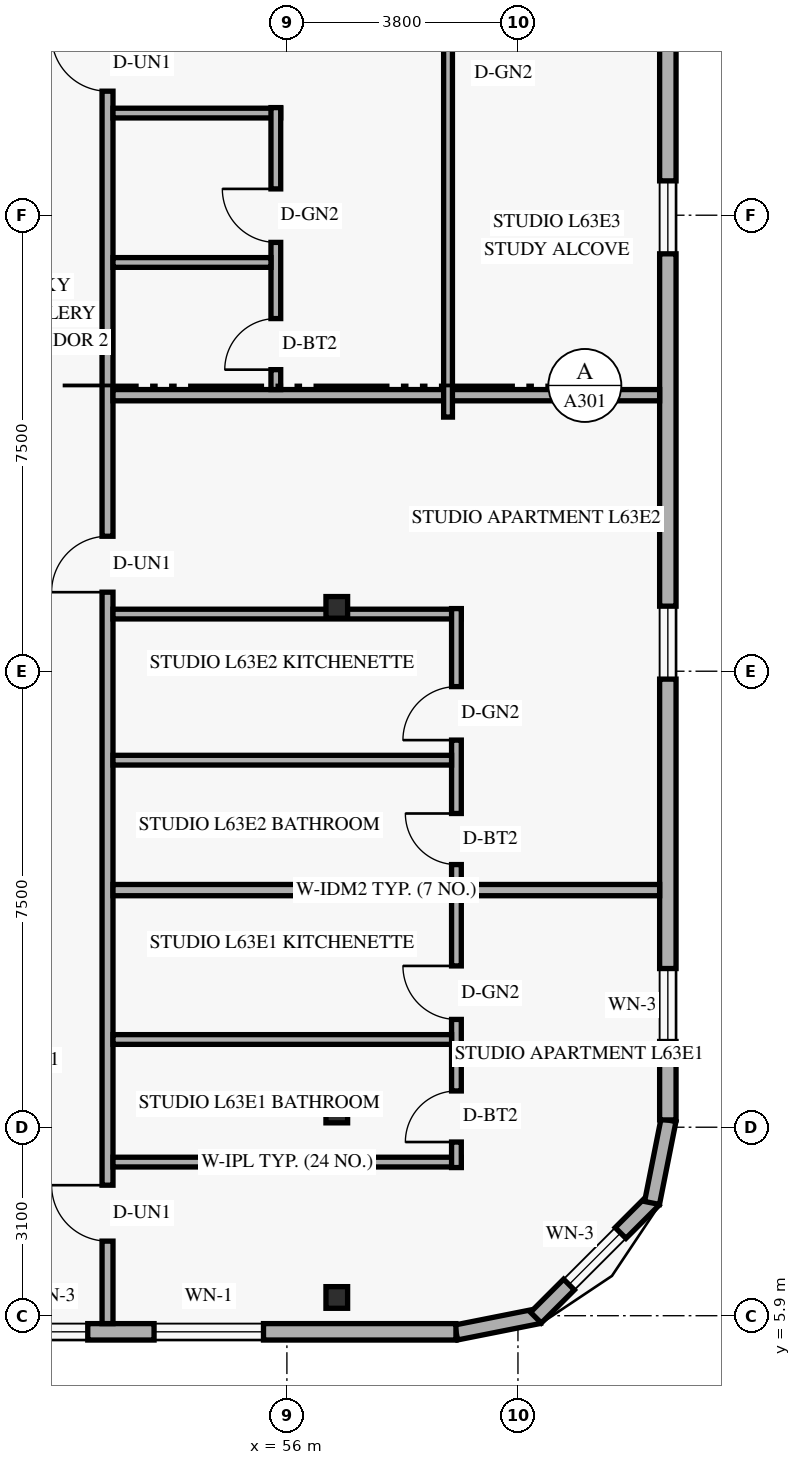
"""IFC4 building model, lengths in metres.
Left out: names, types, materials, properties, quantities, classifications, styles, units other than length and angle.
Written with IfcOpenShell. Run it as: python <this file> out.ifc"""

import sys

from ifc_helpers import new_model, si_unit, direction, frame, frame_2d, origin, origin_2d, place, context, subcontext, project, spatial, rectangle, hollow_rectangle, extrude, element, fill, save


model = new_model("IFC4")
c1 = context("Model", 3, precision=1e-05, world=origin(), true_north=direction((0.0, 1.0)))
c2 = subcontext(c1, "Body", "Model", "MODEL_VIEW")
j1 = project(units=[si_unit("LENGTHUNIT", "METRE"), si_unit("PLANEANGLEUNIT", "RADIAN")], contexts=[c1])
p1 = place(None, origin())
s1 = spatial("IfcSite", under=j1, at=p1, CompositionType="ELEMENT")
p2 = place(p1, origin())
s2 = spatial("IfcBuilding", under=s1, at=p2, CompositionType="ELEMENT")
p3 = place(p2, frame((0.0, 0.0, 242.4)))
s3 = spatial("IfcBuildingStorey", under=s2, at=p3, CompositionType="ELEMENT", Elevation=242.4)
for number, where, z_axis, x_axis in (
    (1, (56.716, 6.2, 0.0), (0.058, 0.0, 0.998), (0.0, 1.0, 0.0)),
    (2, (56.716, 9.25, 0.0), (0.058, 0.0, 0.998), (0.0, 1.0, 0.0)),
    (3, (56.716, 17.55, 0.0), (0.058, 0.0, 0.998), (0.0, 1.0, 0.0)),
):
    element("IfcColumn", number, at=place(p3, frame(where, z_axis=z_axis, x_axis=x_axis)), inside=s3, PredefinedType="COLUMN", context=c2, shape_type="SweptSolid", body=[
        extrude(hollow_rectangle(XDim=0.356, YDim=0.356, WallThickness=0.016, at=origin_2d()), origin(), (0.0, 0.0, 1.0), 3.606),
    ])
p4 = place(p3, frame((58.783, 5.624, 0.0), z_axis=(0.0, 0.0, 1.0), x_axis=(0.980809899341, 0.19496651342, 0.0)))
e4 = element("IfcWall", 4, at=p4, inside=s3, PredefinedType="SOLIDWALL", context=c2, shape_type="SweptSolid", body=[
    extrude(rectangle(XDim=1.389, YDim=0.25, at=frame_2d((0.694, 0.0))), origin(), (0.0, 0.0, 1.0), 3.36),
])
p5 = place(p3, frame((60.095, 5.868, 0.0), z_axis=(0.0, 0.0, 1.0), x_axis=(0.707106781187, 0.707106781187, 0.0)))
e5 = element("IfcWall", 5, at=p5, inside=s3, PredefinedType="SOLIDWALL", context=c2, shape_type="SweptSolid", body=[
    extrude(rectangle(XDim=2.739, YDim=0.25, at=frame_2d((1.37, 0.0))), origin(), (0.0, 0.0, 1.0), 3.36),
])
p6 = place(p5, frame((0.77, 0.0, 0.85)))
e6 = element("IfcOpeningElement", 6, at=p6, cuts=e5, PredefinedType="OPENING", context=c2, shape_type="SweptSolid", body=[
    extrude(rectangle(XDim=1.2, YDim=1.5, at=frame_2d((0.6, 0.75))), frame((0.0, 0.135, 0.0), z_axis=(0.0, -1.0, 0.0), x_axis=(1.0, 0.0, 0.0)), (0.0, 0.0, 1.0), 0.27),
])
p7 = place(p3, frame((62.005, 7.754, 0.0), z_axis=(0.0, 0.0, 1.0), x_axis=(0.195135625965, 0.9807762678, 0.0)))
e7 = element("IfcWall", 7, at=p7, inside=s3, PredefinedType="SOLIDWALL", context=c2, shape_type="SweptSolid", body=[
    extrude(rectangle(XDim=1.389, YDim=0.25, at=frame_2d((0.694, 0.0))), origin(), (0.0, 0.0, 1.0), 3.36),
])
p8 = place(p3, frame((25.82, 5.635, 0.0), z_axis=(0.0, 0.0, 1.0), x_axis=(1.0, 0.0, 0.0)))
e8 = element("IfcWall", 8, at=p8, inside=s3, PredefinedType="SOLIDWALL", context=c2, shape_type="SweptSolid", body=[
    extrude(rectangle(XDim=32.96, YDim=0.27, at=frame_2d((16.48, 0.0))), origin(), (0.0, 0.0, 1.0), 3.36),
])
p9 = place(p8, frame((3.57, 0.0, 0.85)))
e9 = element("IfcOpeningElement", 9, at=p9, cuts=e8, PredefinedType="OPENING", context=c2, shape_type="SweptSolid", body=[
    extrude(rectangle(XDim=1.8, YDim=1.6, at=frame_2d((0.9, 0.8))), frame((0.0, 0.145, 0.0), z_axis=(0.0, -1.0, 0.0), x_axis=(1.0, 0.0, 0.0)), (0.0, 0.0, 1.0), 0.29),
])
p10 = place(p8, frame((16.076, 0.0, 0.85)))
e10 = element("IfcOpeningElement", 10, at=p10, cuts=e8, PredefinedType="OPENING", context=c2, shape_type="SweptSolid", body=[
    extrude(rectangle(XDim=1.8, YDim=1.6, at=frame_2d((0.9, 0.8))), frame((0.0, 0.145, 0.0), z_axis=(0.0, -1.0, 0.0), x_axis=(1.0, 0.0, 0.0)), (0.0, 0.0, 1.0), 0.29),
])
p11 = place(p8, frame((25.705, 0.0, 0.85)))
e11 = element("IfcOpeningElement", 11, at=p11, cuts=e8, PredefinedType="OPENING", context=c2, shape_type="SweptSolid", body=[
    extrude(rectangle(XDim=1.2, YDim=1.5, at=frame_2d((0.6, 0.75))), frame((0.0, 0.145, 0.0), z_axis=(0.0, -1.0, 0.0), x_axis=(1.0, 0.0, 0.0)), (0.0, 0.0, 1.0), 0.29),
])
p12 = place(p8, frame((27.995, 0.0, 0.85)))
e12 = element("IfcOpeningElement", 12, at=p12, cuts=e8, PredefinedType="OPENING", context=c2, shape_type="SweptSolid", body=[
    extrude(rectangle(XDim=1.8, YDim=1.6, at=frame_2d((0.9, 0.8))), frame((0.0, 0.145, 0.0), z_axis=(0.0, -1.0, 0.0), x_axis=(1.0, 0.0, 0.0)), (0.0, 0.0, 1.0), 0.29),
])
p13 = place(p3, frame((62.265, 9.12, 0.0), z_axis=(0.0, 0.0, 1.0), x_axis=(0.0, 1.0, 0.0)))
e13 = element("IfcWall", 13, at=p13, inside=s3, PredefinedType="SOLIDWALL", context=c2, shape_type="SweptSolid", body=[
    extrude(rectangle(XDim=29.76, YDim=0.27, at=frame_2d((14.88, 0.0))), origin(), (0.0, 0.0, 1.0), 3.36),
])
p14 = place(p13, frame((1.29, 0.0, 0.85)))
e14 = element("IfcOpeningElement", 14, at=p14, cuts=e13, PredefinedType="OPENING", context=c2, shape_type="SweptSolid", body=[
    extrude(rectangle(XDim=1.2, YDim=1.5, at=frame_2d((0.6, 0.75))), frame((0.0, 0.145, 0.0), z_axis=(0.0, -1.0, 0.0), x_axis=(1.0, 0.0, 0.0)), (0.0, 0.0, 1.0), 0.29),
])
p15 = place(p13, frame((7.25, 0.0, 0.85)))
e15 = element("IfcOpeningElement", 15, at=p15, cuts=e13, PredefinedType="OPENING", context=c2, shape_type="SweptSolid", body=[
    extrude(rectangle(XDim=1.2, YDim=1.5, at=frame_2d((0.6, 0.75))), frame((0.0, 0.145, 0.0), z_axis=(0.0, -1.0, 0.0), x_axis=(1.0, 0.0, 0.0)), (0.0, 0.0, 1.0), 0.29),
])
p16 = place(p13, frame((14.245, 0.0, 0.85)))
e16 = element("IfcOpeningElement", 16, at=p16, cuts=e13, PredefinedType="OPENING", context=c2, shape_type="SweptSolid", body=[
    extrude(rectangle(XDim=1.2, YDim=1.5, at=frame_2d((0.6, 0.75))), frame((0.0, 0.145, 0.0), z_axis=(0.0, -1.0, 0.0), x_axis=(1.0, 0.0, 0.0)), (0.0, 0.0, 1.0), 0.29),
])
p17 = place(p13, frame((18.315, 0.0, 0.85)))
e17 = element("IfcOpeningElement", 17, at=p17, cuts=e13, PredefinedType="OPENING", context=c2, shape_type="SweptSolid", body=[
    extrude(rectangle(XDim=1.2, YDim=1.5, at=frame_2d((0.6, 0.75))), frame((0.0, 0.145, 0.0), z_axis=(0.0, -1.0, 0.0), x_axis=(1.0, 0.0, 0.0)), (0.0, 0.0, 1.0), 0.29),
])
p18 = place(p13, frame((22.975, 0.0, 0.85)))
e18 = element("IfcOpeningElement", 18, at=p18, cuts=e13, PredefinedType="OPENING", context=c2, shape_type="SweptSolid", body=[
    extrude(rectangle(XDim=1.2, YDim=1.5, at=frame_2d((0.6, 0.75))), frame((0.0, 0.145, 0.0), z_axis=(0.0, -1.0, 0.0), x_axis=(1.0, 0.0, 0.0)), (0.0, 0.0, 1.0), 0.29),
])
p19 = place(p13, frame((27.825, 0.0, 0.85)))
e19 = element("IfcOpeningElement", 19, at=p19, cuts=e13, PredefinedType="OPENING", context=c2, shape_type="SweptSolid", body=[
    extrude(rectangle(XDim=1.2, YDim=1.5, at=frame_2d((0.6, 0.75))), frame((0.0, 0.145, 0.0), z_axis=(0.0, -1.0, 0.0), x_axis=(1.0, 0.0, 0.0)), (0.0, 0.0, 1.0), 0.29),
])
p20 = place(p3, frame((53.05, 5.77, 0.0), z_axis=(0.0, 0.0, 1.0), x_axis=(0.0, 1.0, 0.0)))
e20 = element("IfcWall", 20, at=p20, inside=s3, PredefinedType="STANDARD", context=c2, shape_type="SweptSolid", body=[
    extrude(rectangle(XDim=36.46, YDim=0.18, at=frame_2d((18.23, 0.0))), origin(), (0.0, 0.0, 1.0), 2.803),
])
p21 = place(p20, frame((1.357, 0.0, 0.0)))
e21 = element("IfcOpeningElement", 21, at=p21, cuts=e20, PredefinedType="OPENING", context=c2, shape_type="SweptSolid", body=[
    extrude(rectangle(XDim=0.92, YDim=2.15, at=frame_2d((0.46, 1.075))), frame((0.0, 0.1, 0.0), z_axis=(0.0, -1.0, 0.0), x_axis=(1.0, 0.0, 0.0)), (0.0, 0.0, 1.0), 0.2),
])
p22 = place(p20, frame((12.03, 0.0, 0.0)))
e22 = element("IfcOpeningElement", 22, at=p22, cuts=e20, PredefinedType="OPENING", context=c2, shape_type="SweptSolid", body=[
    extrude(rectangle(XDim=0.92, YDim=2.15, at=frame_2d((0.46, 1.075))), frame((0.0, 0.1, 0.0), z_axis=(0.0, -1.0, 0.0), x_axis=(1.0, 0.0, 0.0)), (0.0, 0.0, 1.0), 0.2),
])
p23 = place(p20, frame((20.27, 0.0, 0.0)))
e23 = element("IfcOpeningElement", 23, at=p23, cuts=e20, PredefinedType="OPENING", context=c2, shape_type="SweptSolid", body=[
    extrude(rectangle(XDim=0.92, YDim=2.15, at=frame_2d((0.46, 1.075))), frame((0.0, 0.1, 0.0), z_axis=(0.0, -1.0, 0.0), x_axis=(1.0, 0.0, 0.0)), (0.0, 0.0, 1.0), 0.2),
])
p24 = place(p20, frame((28.21, 0.0, 0.0)))
e24 = element("IfcOpeningElement", 24, at=p24, cuts=e20, PredefinedType="OPENING", context=c2, shape_type="SweptSolid", body=[
    extrude(rectangle(XDim=0.92, YDim=2.15, at=frame_2d((0.46, 1.075))), frame((0.0, 0.1, 0.0), z_axis=(0.0, -1.0, 0.0), x_axis=(1.0, 0.0, 0.0)), (0.0, 0.0, 1.0), 0.2),
])
p25 = place(p20, frame((35.21, 0.0, 0.0)))
e25 = element("IfcOpeningElement", 25, at=p25, cuts=e20, PredefinedType="OPENING", context=c2, shape_type="SweptSolid", body=[
    extrude(rectangle(XDim=0.92, YDim=2.15, at=frame_2d((0.46, 1.075))), frame((0.0, 0.1, 0.0), z_axis=(0.0, -1.0, 0.0), x_axis=(1.0, 0.0, 0.0)), (0.0, 0.0, 1.0), 0.2),
])
p26 = place(p3, frame((53.14, 8.427, 0.0), z_axis=(0.0, 0.0, 1.0), x_axis=(1.0, 0.0, 0.0)))
e26 = element("IfcWall", 26, at=p26, inside=s3, PredefinedType="PLUMBINGWALL", context=c2, shape_type="SweptSolid", body=[
    extrude(rectangle(XDim=5.728, YDim=0.16, at=frame_2d((2.864, 0.0))), origin(), (0.0, 0.0, 1.0), 2.879),
])
p27 = place(p3, frame((58.788, 8.337, 0.0), z_axis=(0.0, 0.0, 1.0), x_axis=(0.0, 1.0, 0.0)))
e27 = element("IfcWall", 27, at=p27, inside=s3, PredefinedType="PLUMBINGWALL", context=c2, shape_type="SweptSolid", body=[
    extrude(rectangle(XDim=4.563, YDim=0.16, at=frame_2d((2.282, 0.0))), origin(), (0.0, 0.0, 1.0), 3.36),
])
p28 = place(p27, frame((0.42, 0.0, 0.0)))
e28 = element("IfcOpeningElement", 28, at=p28, cuts=e27, PredefinedType="OPENING", context=c2, shape_type="SweptSolid", body=[
    extrude(rectangle(XDim=0.84, YDim=2.12, at=frame_2d((0.42, 1.06))), frame((0.0, 0.09, 0.0), z_axis=(0.0, -1.0, 0.0), x_axis=(1.0, 0.0, 0.0)), (0.0, 0.0, 1.0), 0.18),
])
p29 = place(p27, frame((2.436, 0.0, 0.0)))
e29 = element("IfcOpeningElement", 29, at=p29, cuts=e27, PredefinedType="OPENING", context=c2, shape_type="SweptSolid", body=[
    extrude(rectangle(XDim=0.88, YDim=2.12, at=frame_2d((0.44, 1.06))), frame((0.0, 0.09, 0.0), z_axis=(0.0, -1.0, 0.0), x_axis=(1.0, 0.0, 0.0)), (0.0, 0.0, 1.0), 0.18),
])
p30 = place(p3, frame((53.14, 10.443, 0.0), z_axis=(0.0, 0.0, 1.0), x_axis=(1.0, 0.0, 0.0)))
e30 = element("IfcWall", 30, at=p30, inside=s3, PredefinedType="PLUMBINGWALL", context=c2, shape_type="SweptSolid", body=[
    extrude(rectangle(XDim=5.568, YDim=0.16, at=frame_2d((2.784, 0.0))), origin(), (0.0, 0.0, 1.0), 2.879),
])
p31 = place(p3, frame((53.14, 12.9, 0.0), z_axis=(0.0, 0.0, 1.0), x_axis=(1.0, 0.0, 0.0)))
e31 = element("IfcWall", 31, at=p31, inside=s3, PredefinedType="PARTITIONING", context=c2, shape_type="SweptSolid", body=[
    extrude(rectangle(XDim=8.99, YDim=0.185, at=frame_2d((4.495, 0.0))), origin(), (0.0, 0.0, 1.0), 2.879),
])
p32 = place(p3, frame((53.14, 17.44, 0.0), z_axis=(0.0, 0.0, 1.0), x_axis=(1.0, 0.0, 0.0)))
e32 = element("IfcWall", 32, at=p32, inside=s3, PredefinedType="PLUMBINGWALL", context=c2, shape_type="SweptSolid", body=[
    extrude(rectangle(XDim=5.728, YDim=0.16, at=frame_2d((2.864, 0.0))), origin(), (0.0, 0.0, 1.0), 2.803),
])
p33 = place(p3, frame((58.788, 12.992, 0.0), z_axis=(0.0, 0.0, 1.0), x_axis=(0.0, 1.0, 0.0)))
e33 = element("IfcWall", 33, at=p33, inside=s3, PredefinedType="PLUMBINGWALL", context=c2, shape_type="SweptSolid", body=[
    extrude(rectangle(XDim=4.538, YDim=0.16, at=frame_2d((2.269, 0.0))), origin(), (0.0, 0.0, 1.0), 3.36),
])
p34 = place(p33, frame((0.327, 0.0, 0.0)))
e34 = element("IfcOpeningElement", 34, at=p34, cuts=e33, PredefinedType="OPENING", context=c2, shape_type="SweptSolid", body=[
    extrude(rectangle(XDim=0.84, YDim=2.12, at=frame_2d((0.42, 1.06))), frame((0.0, 0.09, 0.0), z_axis=(0.0, -1.0, 0.0), x_axis=(1.0, 0.0, 0.0)), (0.0, 0.0, 1.0), 0.18),
])
p35 = place(p33, frame((2.375, 0.0, 0.0)))
e35 = element("IfcOpeningElement", 35, at=p35, cuts=e33, PredefinedType="OPENING", context=c2, shape_type="SweptSolid", body=[
    extrude(rectangle(XDim=0.88, YDim=2.12, at=frame_2d((0.44, 1.06))), frame((0.0, 0.09, 0.0), z_axis=(0.0, -1.0, 0.0), x_axis=(1.0, 0.0, 0.0)), (0.0, 0.0, 1.0), 0.18),
])
p36 = place(p3, frame((53.14, 15.037, 0.0), z_axis=(0.0, 0.0, 1.0), x_axis=(1.0, 0.0, 0.0)))
e36 = element("IfcWall", 36, at=p36, inside=s3, PredefinedType="PLUMBINGWALL", context=c2, shape_type="SweptSolid", body=[
    extrude(rectangle(XDim=5.568, YDim=0.16, at=frame_2d((2.784, 0.0))), origin(), (0.0, 0.0, 1.0), 2.879),
])
p37 = place(p3, frame((53.14, 21.04, 0.0), z_axis=(0.0, 0.0, 1.0), x_axis=(1.0, 0.0, 0.0)))
e37 = element("IfcWall", 37, at=p37, inside=s3, PredefinedType="PARTITIONING", context=c2, shape_type="SweptSolid", body=[
    extrude(rectangle(XDim=8.99, YDim=0.185, at=frame_2d((4.495, 0.0))), origin(), (0.0, 0.0, 1.0), 2.879),
])
p38 = place(p3, frame((53.14, 25.68, 0.0), z_axis=(0.0, 0.0, 1.0), x_axis=(1.0, 0.0, 0.0)))
e38 = element("IfcWall", 38, at=p38, inside=s3, PredefinedType="PLUMBINGWALL", context=c2, shape_type="SweptSolid", body=[
    extrude(rectangle(XDim=2.758, YDim=0.16, at=frame_2d((1.379, 0.0))), origin(), (0.0, 0.0, 1.0), 3.36),
])
p39 = place(p3, frame((55.818, 21.133, 0.0), z_axis=(0.0, 0.0, 1.0), x_axis=(0.0, 1.0, 0.0)))
e39 = element("IfcWall", 39, at=p39, inside=s3, PredefinedType="PLUMBINGWALL", context=c2, shape_type="SweptSolid", body=[
    extrude(rectangle(XDim=4.637, YDim=0.16, at=frame_2d((2.319, 0.0))), origin(), (0.0, 0.0, 1.0), 3.36),
])
p40 = place(p39, frame((0.327, 0.0, 0.0)))
e40 = element("IfcOpeningElement", 40, at=p40, cuts=e39, PredefinedType="OPENING", context=c2, shape_type="SweptSolid", body=[
    extrude(rectangle(XDim=0.84, YDim=2.12, at=frame_2d((0.42, 1.06))), frame((0.0, 0.09, 0.0), z_axis=(0.0, -1.0, 0.0), x_axis=(1.0, 0.0, 0.0)), (0.0, 0.0, 1.0), 0.18),
])
p41 = place(p39, frame((2.42, 0.0, 0.0)))
e41 = element("IfcOpeningElement", 41, at=p41, cuts=e39, PredefinedType="OPENING", context=c2, shape_type="SweptSolid", body=[
    extrude(rectangle(XDim=0.88, YDim=2.12, at=frame_2d((0.44, 1.06))), frame((0.0, 0.09, 0.0), z_axis=(0.0, -1.0, 0.0), x_axis=(1.0, 0.0, 0.0)), (0.0, 0.0, 1.0), 0.18),
])
p42 = place(p3, frame((53.14, 23.223, 0.0), z_axis=(0.0, 0.0, 1.0), x_axis=(1.0, 0.0, 0.0)))
e42 = element("IfcWall", 42, at=p42, inside=s3, PredefinedType="PLUMBINGWALL", context=c2, shape_type="SweptSolid", body=[
    extrude(rectangle(XDim=2.598, YDim=0.16, at=frame_2d((1.299, 0.0))), origin(), (0.0, 0.0, 1.0), 3.36),
])
p43 = place(p3, frame((58.65, 20.68, 0.0), z_axis=(0.0, 0.0, 1.0), x_axis=(0.0, 1.0, 0.0)))
e43 = element("IfcWall", 43, at=p43, inside=s3, PredefinedType="PARTITIONING", context=c2, shape_type="SweptSolid", body=[
    extrude(rectangle(XDim=6.21, YDim=0.145, at=frame_2d((3.105, 0.0))), origin(), (0.0, 0.0, 1.0), 3.36),
])
p44 = place(p6, origin())
e44 = element("IfcWindow", 44, at=p44, inside=s3, PartitioningType="SINGLE_PANEL", PredefinedType="WINDOW", context=c2, shape_type="SweptSolid", body=[
    extrude(rectangle(XDim=1.2, YDim=1.5, at=frame_2d((0.6, 0.75))), frame((0.0, 0.03, 0.0), z_axis=(0.0, -1.0, 0.0), x_axis=(1.0, 0.0, 0.0)), (0.0, 0.0, 1.0), 0.06),
])
fill(e6, e44)
p45 = place(p11, origin())
e45 = element("IfcWindow", 45, at=p45, inside=s3, PartitioningType="SINGLE_PANEL", PredefinedType="WINDOW", context=c2, shape_type="SweptSolid", body=[
    extrude(rectangle(XDim=1.2, YDim=1.5, at=frame_2d((0.6, 0.75))), frame((0.0, 0.03, 0.0), z_axis=(0.0, -1.0, 0.0), x_axis=(1.0, 0.0, 0.0)), (0.0, 0.0, 1.0), 0.06),
])
fill(e11, e45)
p46 = place(p12, origin())
e46 = element("IfcWindow", 46, at=p46, inside=s3, PartitioningType="SINGLE_PANEL", PredefinedType="WINDOW", context=c2, shape_type="SweptSolid", body=[
    extrude(rectangle(XDim=1.8, YDim=1.6, at=frame_2d((0.9, 0.8))), frame((0.0, 0.03, 0.0), z_axis=(0.0, -1.0, 0.0), x_axis=(1.0, 0.0, 0.0)), (0.0, 0.0, 1.0), 0.06),
])
fill(e12, e46)
p47 = place(p14, origin())
e47 = element("IfcWindow", 47, at=p47, inside=s3, PartitioningType="SINGLE_PANEL", PredefinedType="WINDOW", context=c2, shape_type="SweptSolid", body=[
    extrude(rectangle(XDim=1.2, YDim=1.5, at=frame_2d((0.6, 0.75))), frame((0.0, 0.03, 0.0), z_axis=(0.0, -1.0, 0.0), x_axis=(1.0, 0.0, 0.0)), (0.0, 0.0, 1.0), 0.06),
])
fill(e14, e47)
p48 = place(p15, origin())
e48 = element("IfcWindow", 48, at=p48, inside=s3, PartitioningType="SINGLE_PANEL", PredefinedType="WINDOW", context=c2, shape_type="SweptSolid", body=[
    extrude(rectangle(XDim=1.2, YDim=1.5, at=frame_2d((0.6, 0.75))), frame((0.0, 0.03, 0.0), z_axis=(0.0, -1.0, 0.0), x_axis=(1.0, 0.0, 0.0)), (0.0, 0.0, 1.0), 0.06),
])
fill(e15, e48)
p49 = place(p16, origin())
e49 = element("IfcWindow", 49, at=p49, inside=s3, PartitioningType="SINGLE_PANEL", PredefinedType="WINDOW", context=c2, shape_type="SweptSolid", body=[
    extrude(rectangle(XDim=1.2, YDim=1.5, at=frame_2d((0.6, 0.75))), frame((0.0, 0.03, 0.0), z_axis=(0.0, -1.0, 0.0), x_axis=(1.0, 0.0, 0.0)), (0.0, 0.0, 1.0), 0.06),
])
fill(e16, e49)
p50 = place(p21, origin())
e50 = element("IfcDoor", 50, at=p50, inside=s3, OperationType="SINGLE_SWING_RIGHT", PredefinedType="DOOR", context=c2, shape_type="SweptSolid", body=[
    extrude(rectangle(XDim=0.92, YDim=2.15, at=frame_2d((0.46, 1.075))), frame((0.0, 0.025, 0.0), z_axis=(0.0, -1.0, 0.0), x_axis=(1.0, 0.0, 0.0)), (0.0, 0.0, 1.0), 0.05),
])
fill(e21, e50)
p51 = place(p28, origin())
e51 = element("IfcDoor", 51, at=p51, inside=s3, OperationType="SINGLE_SWING_LEFT", PredefinedType="DOOR", context=c2, shape_type="SweptSolid", body=[
    extrude(rectangle(XDim=0.84, YDim=2.12, at=frame_2d((0.42, 1.06))), frame((0.0, 0.025, 0.0), z_axis=(0.0, -1.0, 0.0), x_axis=(1.0, 0.0, 0.0)), (0.0, 0.0, 1.0), 0.05),
])
fill(e28, e51)
p52 = place(p29, origin())
e52 = element("IfcDoor", 52, at=p52, inside=s3, OperationType="SINGLE_SWING_RIGHT", PredefinedType="DOOR", context=c2, shape_type="SweptSolid", body=[
    extrude(rectangle(XDim=0.88, YDim=2.12, at=frame_2d((0.44, 1.06))), frame((0.0, 0.025, 0.0), z_axis=(0.0, -1.0, 0.0), x_axis=(1.0, 0.0, 0.0)), (0.0, 0.0, 1.0), 0.05),
])
fill(e29, e52)
p53 = place(p22, origin())
e53 = element("IfcDoor", 53, at=p53, inside=s3, OperationType="SINGLE_SWING_LEFT", PredefinedType="DOOR", context=c2, shape_type="SweptSolid", body=[
    extrude(rectangle(XDim=0.92, YDim=2.15, at=frame_2d((0.46, 1.075))), frame((0.0, 0.025, 0.0), z_axis=(0.0, -1.0, 0.0), x_axis=(1.0, 0.0, 0.0)), (0.0, 0.0, 1.0), 0.05),
])
fill(e22, e53)
p54 = place(p34, origin())
e54 = element("IfcDoor", 54, at=p54, inside=s3, OperationType="SINGLE_SWING_RIGHT", PredefinedType="DOOR", context=c2, shape_type="SweptSolid", body=[
    extrude(rectangle(XDim=0.84, YDim=2.12, at=frame_2d((0.42, 1.06))), frame((0.0, 0.025, 0.0), z_axis=(0.0, -1.0, 0.0), x_axis=(1.0, 0.0, 0.0)), (0.0, 0.0, 1.0), 0.05),
])
fill(e34, e54)
p55 = place(p35, origin())
e55 = element("IfcDoor", 55, at=p55, inside=s3, OperationType="SINGLE_SWING_LEFT", PredefinedType="DOOR", context=c2, shape_type="SweptSolid", body=[
    extrude(rectangle(XDim=0.88, YDim=2.12, at=frame_2d((0.44, 1.06))), frame((0.0, 0.025, 0.0), z_axis=(0.0, -1.0, 0.0), x_axis=(1.0, 0.0, 0.0)), (0.0, 0.0, 1.0), 0.05),
])
fill(e35, e55)
p56 = place(p23, origin())
e56 = element("IfcDoor", 56, at=p56, inside=s3, OperationType="SINGLE_SWING_RIGHT", PredefinedType="DOOR", context=c2, shape_type="SweptSolid", body=[
    extrude(rectangle(XDim=0.92, YDim=2.15, at=frame_2d((0.46, 1.075))), frame((0.0, 0.025, 0.0), z_axis=(0.0, -1.0, 0.0), x_axis=(1.0, 0.0, 0.0)), (0.0, 0.0, 1.0), 0.05),
])
fill(e23, e56)
p57 = place(p40, origin())
e57 = element("IfcDoor", 57, at=p57, inside=s3, OperationType="SINGLE_SWING_LEFT", PredefinedType="DOOR", context=c2, shape_type="SweptSolid", body=[
    extrude(rectangle(XDim=0.84, YDim=2.12, at=frame_2d((0.42, 1.06))), frame((0.0, 0.025, 0.0), z_axis=(0.0, -1.0, 0.0), x_axis=(1.0, 0.0, 0.0)), (0.0, 0.0, 1.0), 0.05),
])
fill(e40, e57)
p58 = place(p41, origin())
e58 = element("IfcDoor", 58, at=p58, inside=s3, OperationType="SINGLE_SWING_RIGHT", PredefinedType="DOOR", context=c2, shape_type="SweptSolid", body=[
    extrude(rectangle(XDim=0.88, YDim=2.12, at=frame_2d((0.44, 1.06))), frame((0.0, 0.025, 0.0), z_axis=(0.0, -1.0, 0.0), x_axis=(1.0, 0.0, 0.0)), (0.0, 0.0, 1.0), 0.05),
])
fill(e41, e58)
save(model, sys.argv[1])
